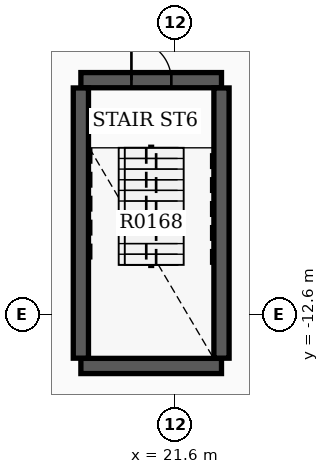
"""IFC4 building model, lengths in metres.
Left out: names, types, materials, properties, quantities, classifications, styles, units other than length and angle.
Written with IfcOpenShell. Run it as: python <this file> out.ifc"""

import sys

from ifc_helpers import new_model, si_unit, direction, frame, frame_2d, origin, place, context, subcontext, project, spatial, rectangle, extrude, element, fill, save


model = new_model("IFC4")
c1 = context("Model", 3, precision=1e-05, world=origin(), true_north=direction((0.0, 1.0)))
c2 = subcontext(c1, "Body", "Model", "MODEL_VIEW")
j1 = project(units=[si_unit("LENGTHUNIT", "METRE"), si_unit("PLANEANGLEUNIT", "RADIAN")], contexts=[c1])
p1 = place(None, origin())
s1 = spatial("IfcSite", under=j1, at=p1, CompositionType="ELEMENT")
p2 = place(p1, origin())
s2 = spatial("IfcBuilding", under=s1, at=p2, CompositionType="ELEMENT")
p3 = place(p2, frame((0.0, 0.0, 10.2)))
s3 = spatial("IfcBuildingStorey", under=s2, at=p3, CompositionType="ELEMENT", Elevation=10.2)
p4 = place(p3, frame((19.12, -6.43, 0.0), z_axis=(0.0, 0.0, 1.0), x_axis=(1.0, 0.0, 0.0)))
e1 = element("IfcWall", 1, at=p4, inside=s3, PredefinedType="SHEAR", context=c2, shape_type="SweptSolid", body=[
    extrude(rectangle(XDim=3.7, YDim=0.4, at=frame_2d((1.85, 0.0))), origin(), (0.0, 0.0, 1.0), 4.25),
])
p5 = place(p4, frame((1.33, 0.0, 0.0)))
e2 = element("IfcOpeningElement", 2, at=p5, cuts=e1, PredefinedType="OPENING", context=c2, shape_type="SweptSolid", body=[
    extrude(rectangle(XDim=1.05, YDim=2.15, at=frame_2d((0.525, 1.075))), frame((0.0, 0.21, 0.0), z_axis=(0.0, -1.0, 0.0), x_axis=(1.0, 0.0, 0.0)), (0.0, 0.0, 1.0), 0.42),
])
p6 = place(p3, frame((19.12, -13.95, 0.0), z_axis=(0.0, 0.0, 1.0), x_axis=(1.0, 0.0, 0.0)))
e3 = element("IfcWall", 3, at=p6, inside=s3, PredefinedType="SHEAR", context=c2, shape_type="SweptSolid", body=[
    extrude(rectangle(XDim=3.7, YDim=0.4, at=frame_2d((1.85, 0.0))), origin(), (0.0, 0.0, 1.0), 4.25),
])
for number, where, z_axis, x_axis in (
    (4, (19.12, -13.745, 0.0), (0.0, 0.0, 1.0), (0.0, 1.0, 0.0)),
    (5, (22.82, -13.745, 0.0), (0.0, 0.0, 1.0), (0.0, 1.0, 0.0)),
):
    element("IfcWall", number, at=place(p3, frame(where, z_axis=z_axis, x_axis=x_axis)), inside=s3, PredefinedType="SHEAR", context=c2, shape_type="SweptSolid", body=[
        extrude(rectangle(XDim=7.11, YDim=0.4, at=frame_2d((3.555, 0.0))), origin(), (0.0, 0.0, 1.0), 4.25),
    ])
p7 = place(p5, origin())
e6 = element("IfcDoor", 6, at=p7, inside=s3, OperationType="SINGLE_SWING_LEFT", PredefinedType="DOOR", context=c2, shape_type="SweptSolid", body=[
    extrude(rectangle(XDim=1.05, YDim=2.15, at=frame_2d((0.525, 1.075))), frame((0.0, 0.025, 0.0), z_axis=(0.0, -1.0, 0.0), x_axis=(1.0, 0.0, 0.0)), (0.0, 0.0, 1.0), 0.05),
])
fill(e2, e6)
save(model, sys.argv[1])
